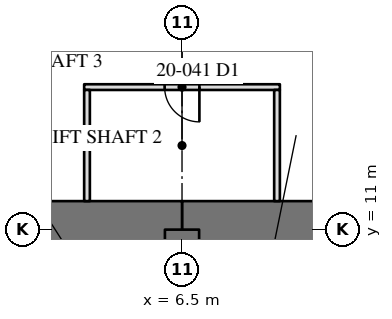
"""IFC4 building model, lengths in metres.
Left out: names, types, materials, properties, quantities, classifications, styles, units other than length and angle.
Written with IfcOpenShell. Run it as: python <this file> out.ifc"""

import sys

from ifc_helpers import new_model, si_unit, direction, frame, frame_2d, origin, place, context, subcontext, project, spatial, rectangle, extrude, element, fill, save


model = new_model("IFC4")
c1 = context("Model", 3, precision=1e-05, world=origin(), true_north=direction((0.0, 1.0)))
c2 = subcontext(c1, "Body", "Model", "MODEL_VIEW")
j1 = project(units=[si_unit("LENGTHUNIT", "METRE"), si_unit("PLANEANGLEUNIT", "RADIAN")], contexts=[c1])
p1 = place(None, origin())
s1 = spatial("IfcSite", under=j1, at=p1, CompositionType="ELEMENT")
p2 = place(p1, origin())
s2 = spatial("IfcBuilding", under=s1, at=p2, CompositionType="ELEMENT")
p3 = place(p2, frame((0.0, 0.0, 85.7)))
s3 = spatial("IfcBuildingStorey", under=s2, at=p3, CompositionType="ELEMENT", Elevation=85.7)
p4 = place(p3, frame((11.0, 11.0, 0.0), z_axis=(0.0, 0.0, 1.0), x_axis=(-1.0, 0.0, 0.0)))
e1 = element("IfcWall", 1, at=p4, inside=s3, PredefinedType="SHEAR", context=c2, shape_type="SweptSolid", body=[
    extrude(rectangle(XDim=4.5, YDim=1.5, at=frame_2d((2.25, 0.0))), origin(), (0.0, 0.0, 1.0), 4.1),
])
p5 = place(p3, frame((6.5, 11.0, 0.0), z_axis=(0.0, 0.0, 1.0), x_axis=(-1.0, 0.0, 0.0)))
e2 = element("IfcWall", 2, at=p5, inside=s3, PredefinedType="SHEAR", context=c2, shape_type="SweptSolid", body=[
    extrude(rectangle(XDim=13.0, YDim=1.5, at=frame_2d((6.5, 0.0))), origin(), (0.0, 0.0, 1.0), 4.1),
])
p6 = place(p3, frame((6.5, 6.5, 0.0), z_axis=(0.0, 0.0, 1.0), x_axis=(0.0, 1.0, 0.0)))
e3 = element("IfcWall", 3, at=p6, inside=s3, PredefinedType="SHEAR", context=c2, shape_type="SweptSolid", body=[
    extrude(rectangle(XDim=4.5, YDim=0.9, at=frame_2d((2.25, 0.0))), origin(), (0.0, 0.0, 1.0), 4.1),
])
p7 = place(p3, frame((9.075, 14.75, 0.0), z_axis=(0.0, 0.0, 1.0), x_axis=(-1.0, 0.0, 0.0)))
e4 = element("IfcWall", 4, at=p7, inside=s3, PredefinedType="PARTITIONING", context=c2, shape_type="SweptSolid", body=[
    extrude(rectangle(XDim=5.15, YDim=0.15, at=frame_2d((2.575, 0.0))), origin(), (0.0, 0.0, 1.0), 3.91),
])
p8 = place(p7, frame((2.117, 0.0, 0.0)))
e5 = element("IfcOpeningElement", 5, at=p8, cuts=e4, PredefinedType="OPENING", context=c2, shape_type="SweptSolid", body=[
    extrude(rectangle(XDim=0.915, YDim=2.134, at=frame_2d((0.458, 1.067))), frame((0.0, 0.085, 0.0), z_axis=(0.0, -1.0, 0.0), x_axis=(1.0, 0.0, 0.0)), (0.0, 0.0, 1.0), 0.17),
])
for number, where, z_axis, x_axis in (
    (6, (9.0, 14.675, 0.0), (0.0, 0.0, 1.0), (0.0, -1.0, 0.0)),
    (7, (4.0, 14.675, 0.0), (0.0, 0.0, 1.0), (0.0, -1.0, 0.0)),
):
    element("IfcWall", number, at=place(p3, frame(where, z_axis=z_axis, x_axis=x_axis)), inside=s3, PredefinedType="PARTITIONING", context=c2, shape_type="SweptSolid", body=[
        extrude(rectangle(XDim=2.925, YDim=0.15, at=frame_2d((1.462, 0.0))), origin(), (0.0, 0.0, 1.0), 3.91),
    ])
p9 = place(p8, origin())
e8 = element("IfcDoor", 8, at=p9, inside=s3, OperationType="SINGLE_SWING_LEFT", PredefinedType="DOOR", context=c2, shape_type="SweptSolid", body=[
    extrude(rectangle(XDim=0.915, YDim=2.134, at=frame_2d((0.458, 1.067))), frame((0.0, 0.025, 0.0), z_axis=(0.0, -1.0, 0.0), x_axis=(1.0, 0.0, 0.0)), (0.0, 0.0, 1.0), 0.05),
])
fill(e5, e8)
save(model, sys.argv[1])
